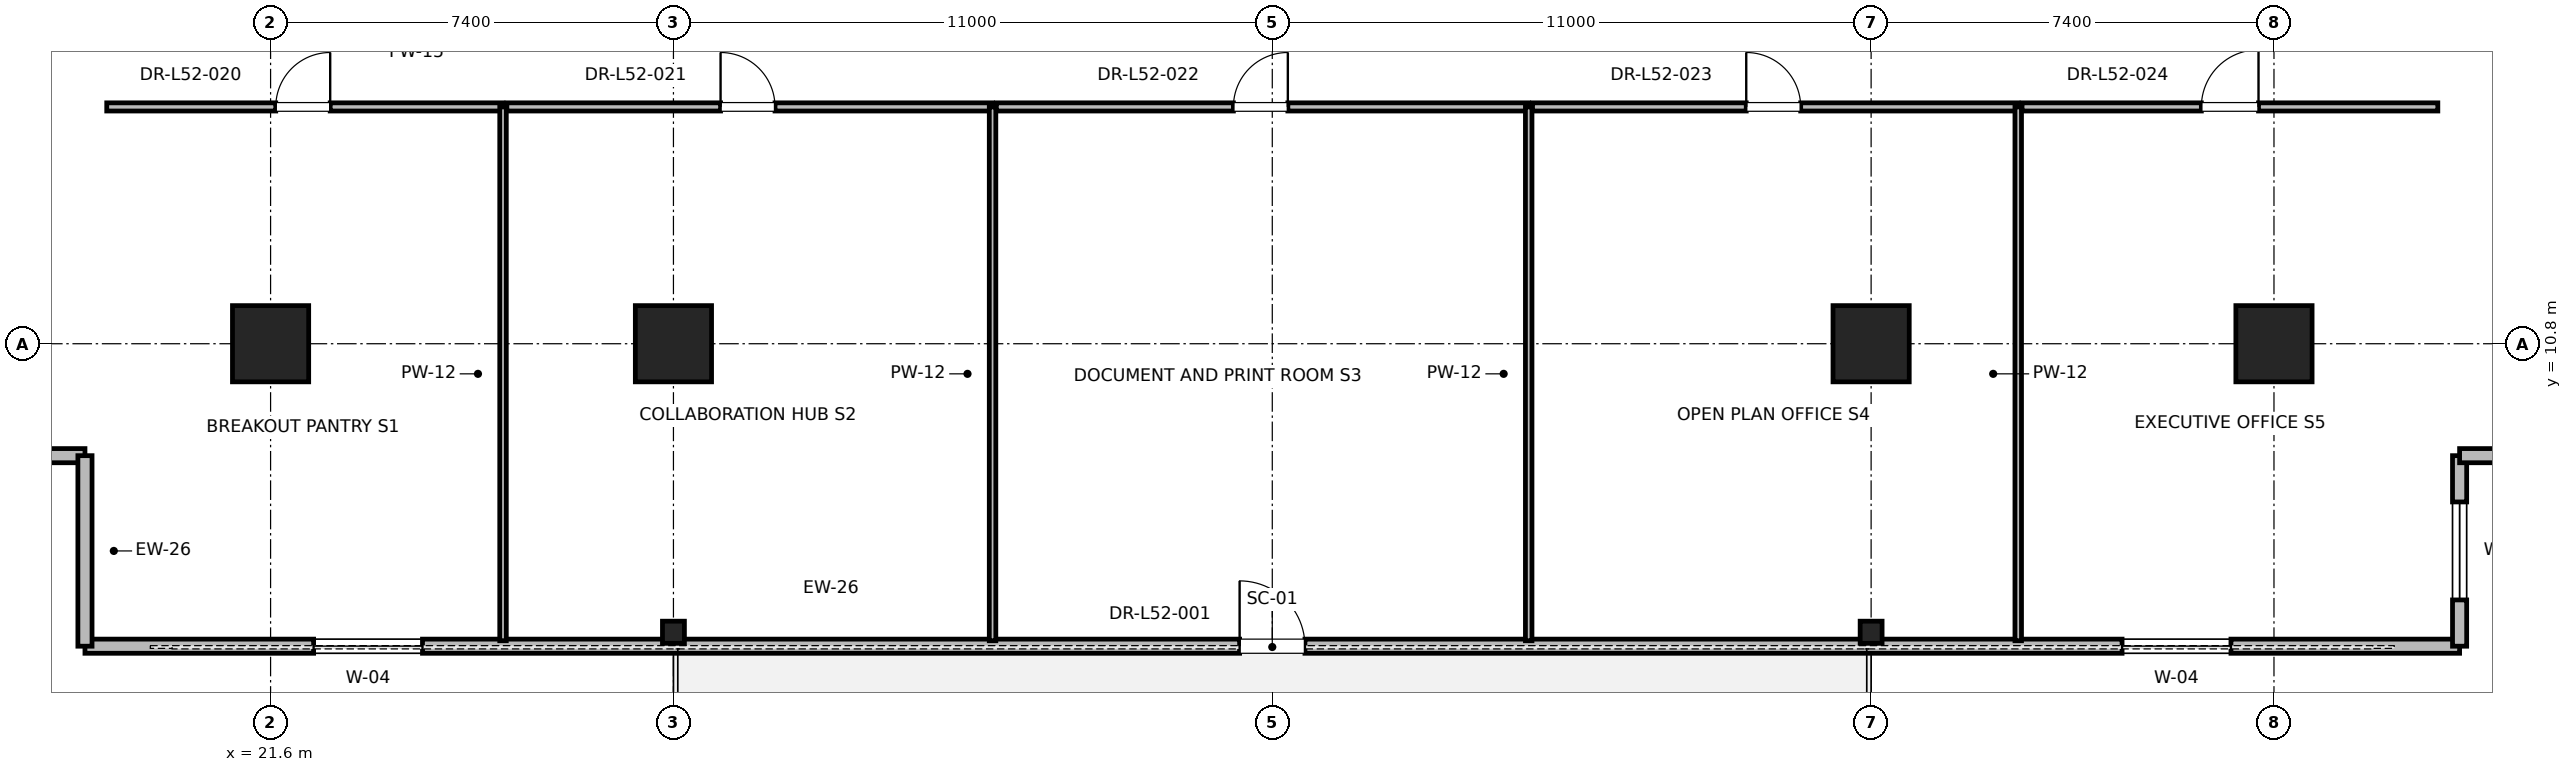
"""IFC4 building model, lengths in metres.
Left out: names, types, materials, properties, quantities, classifications, styles, units other than length and angle.
Written with IfcOpenShell. Run it as: python <this file> out.ifc"""

import sys

from ifc_helpers import new_model, si_unit, direction, frame, frame_2d, origin, origin_2d, place, context, subcontext, project, spatial, rectangle, i_section, extrude, element, fill, save


model = new_model("IFC4")
c1 = context("Model", 3, precision=1e-05, world=origin(), true_north=direction((0.0, 1.0)))
c2 = subcontext(c1, "Body", "Model", "MODEL_VIEW")
j1 = project(units=[si_unit("LENGTHUNIT", "METRE"), si_unit("PLANEANGLEUNIT", "RADIAN")], contexts=[c1])
p1 = place(None, origin())
s1 = spatial("IfcSite", under=j1, at=p1, CompositionType="ELEMENT")
p2 = place(p1, origin())
s2 = spatial("IfcBuilding", under=s1, at=p2, CompositionType="ELEMENT")
p3 = place(p2, frame((0.0, 0.0, 225.2)))
s3 = spatial("IfcBuildingStorey", under=s2, at=p3, CompositionType="ELEMENT", Elevation=225.2)
for number, where, z_axis, x_axis in (
    (1, (29.0, 10.8, 0.0), (0.0, 0.0, 1.0), (1.0, 0.0, 0.0)),
    (2, (51.0, 10.8, 0.0), (0.0, 0.0, 1.0), (1.0, 0.0, 0.0)),
    (3, (21.6, 10.8, 0.0), (0.0, 0.0, 1.0), (1.0, 0.0, 0.0)),
    (4, (58.4, 10.8, 0.0), (0.0, 0.0, 1.0), (1.0, 0.0, 0.0)),
):
    element("IfcColumn", number, at=place(p3, frame(where, z_axis=z_axis, x_axis=x_axis)), inside=s3, PredefinedType="COLUMN", context=c2, shape_type="SweptSolid", body=[
        extrude(rectangle(XDim=1.4, YDim=1.4, at=origin_2d()), origin(), (0.0, 0.0, 1.0), 4.0),
    ])
for number, where, z_axis, x_axis in (
    (5, (29.0, 5.5, 0.0), (0.0, 0.0, 1.0), (1.0, 0.0, 0.0)),
    (6, (51.0, 5.5, 0.0), (0.0, 0.0, 1.0), (1.0, 0.0, 0.0)),
):
    element("IfcColumn", number, at=place(p3, frame(where, z_axis=z_axis, x_axis=x_axis)), inside=s3, PredefinedType="COLUMN", context=c2, shape_type="SweptSolid", body=[
        extrude(i_section(OverallWidth=0.403, OverallDepth=0.406, WebThickness=0.027, FlangeThickness=0.043, FilletRadius=0.015, at=origin_2d()), origin(), (0.0, 0.0, 1.0), 4.0),
    ])
p4 = place(p3, frame((18.19, 5.244, 0.0), z_axis=(0.0, 0.0, 1.0), x_axis=(1.0, 0.0, 0.0)))
e7 = element("IfcWall", 7, at=p4, inside=s3, PredefinedType="PARAPET", context=c2, shape_type="SweptSolid", body=[
    extrude(rectangle(XDim=43.62, YDim=0.26, at=frame_2d((21.81, 0.0))), origin(), (0.0, 0.0, 1.0), 3.047),
])
p5 = place(p4, frame((4.2, 0.0, 0.85)))
e8 = element("IfcOpeningElement", 8, at=p5, cuts=e7, PredefinedType="OPENING", context=c2, shape_type="SweptSolid", body=[
    extrude(rectangle(XDim=2.0, YDim=2.3, at=frame_2d((1.0, 1.15))), frame((0.0, 0.13, 0.0), z_axis=(0.0, -1.0, 0.0), x_axis=(1.0, 0.0, 0.0)), (0.0, 0.0, 1.0), 0.26),
])
p6 = place(p4, frame((21.21, 0.0, 0.0)))
e9 = element("IfcOpeningElement", 9, at=p6, cuts=e7, PredefinedType="OPENING", context=c2, shape_type="SweptSolid", body=[
    extrude(rectangle(XDim=1.2, YDim=2.2, at=frame_2d((0.6, 1.1))), frame((0.0, 0.13, 0.0), z_axis=(0.0, -1.0, 0.0), x_axis=(1.0, 0.0, 0.0)), (0.0, 0.0, 1.0), 0.26),
])
p7 = place(p4, frame((37.419, 0.0, 0.85)))
e10 = element("IfcOpeningElement", 10, at=p7, cuts=e7, PredefinedType="OPENING", context=c2, shape_type="SweptSolid", body=[
    extrude(rectangle(XDim=2.0, YDim=2.3, at=frame_2d((1.0, 1.15))), frame((0.0, 0.13, 0.0), z_axis=(0.0, -1.0, 0.0), x_axis=(1.0, 0.0, 0.0)), (0.0, 0.0, 1.0), 0.26),
])
p8 = place(p3, frame((14.19, 8.744, 0.0), z_axis=(0.0, 0.0, 1.0), x_axis=(1.0, 0.0, 0.0)))
e11 = element("IfcWall", 11, at=p8, inside=s3, PredefinedType="PARAPET", context=c2, shape_type="SweptSolid", body=[
    extrude(rectangle(XDim=4.0, YDim=0.26, at=frame_2d((2.0, 0.0))), origin(), (0.0, 0.0, 1.0), 3.775),
])
p9 = place(p8, frame((1.1, 0.0, 0.85)))
e12 = element("IfcOpeningElement", 12, at=p9, cuts=e11, PredefinedType="OPENING", context=c2, shape_type="SweptSolid", body=[
    extrude(rectangle(XDim=1.8, YDim=2.2, at=frame_2d((0.9, 1.1))), frame((0.0, 0.13, 0.0), z_axis=(0.0, -1.0, 0.0), x_axis=(1.0, 0.0, 0.0)), (0.0, 0.0, 1.0), 0.26),
])
p10 = place(p3, frame((18.19, 8.744, 0.0), z_axis=(0.0, 0.0, 1.0), x_axis=(0.0, -1.0, 0.0)))
e13 = element("IfcWall", 13, at=p10, inside=s3, PredefinedType="PARAPET", context=c2, shape_type="SweptSolid", body=[
    extrude(rectangle(XDim=3.5, YDim=0.26, at=frame_2d((1.75, 0.0))), origin(), (0.0, 0.0, 1.0), 3.775),
])
p11 = place(p3, frame((61.81, 5.244, 0.0), z_axis=(0.0, 0.0, 1.0), x_axis=(0.0, 1.0, 0.0)))
e14 = element("IfcWall", 14, at=p11, inside=s3, PredefinedType="PARAPET", context=c2, shape_type="SweptSolid", body=[
    extrude(rectangle(XDim=3.5, YDim=0.26, at=frame_2d((1.75, 0.0))), origin(), (0.0, 0.0, 1.0), 3.775),
])
p12 = place(p11, frame((0.85, 0.0, 0.85)))
e15 = element("IfcOpeningElement", 15, at=p12, cuts=e14, PredefinedType="OPENING", context=c2, shape_type="SweptSolid", body=[
    extrude(rectangle(XDim=1.8, YDim=2.2, at=frame_2d((0.9, 1.1))), frame((0.0, 0.13, 0.0), z_axis=(0.0, -1.0, 0.0), x_axis=(1.0, 0.0, 0.0)), (0.0, 0.0, 1.0), 0.26),
])
p13 = place(p3, frame((61.81, 8.744, 0.0), z_axis=(0.0, 0.0, 1.0), x_axis=(1.0, 0.0, 0.0)))
e16 = element("IfcWall", 16, at=p13, inside=s3, PredefinedType="PARAPET", context=c2, shape_type="SweptSolid", body=[
    extrude(rectangle(XDim=4.0, YDim=0.26, at=frame_2d((2.0, 0.0))), origin(), (0.0, 0.0, 1.0), 3.775),
])
p14 = place(p3, frame((18.59, 15.15, 0.0), z_axis=(0.0, 0.0, 1.0), x_axis=(1.0, 0.0, 0.0)))
e17 = element("IfcWall", 17, at=p14, inside=s3, PredefinedType="PARTITIONING", context=c2, shape_type="SweptSolid", body=[
    extrude(rectangle(XDim=7.279, YDim=0.15, at=frame_2d((3.64, 0.0))), origin(), (0.0, 0.0, 1.0), 2.85),
])
p15 = place(p14, frame((3.104, 0.0, 0.0)))
e18 = element("IfcOpeningElement", 18, at=p15, cuts=e17, PredefinedType="OPENING", context=c2, shape_type="SweptSolid", body=[
    extrude(rectangle(XDim=1.0, YDim=2.15, at=frame_2d((0.5, 1.075))), frame((0.0, 0.075, 0.0), z_axis=(0.0, -1.0, 0.0), x_axis=(1.0, 0.0, 0.0)), (0.0, 0.0, 1.0), 0.15),
])
p16 = place(p3, frame((25.87, 5.344, 0.0), z_axis=(0.0, 0.0, 1.0), x_axis=(0.0, 1.0, 0.0)))
e19 = element("IfcWall", 19, at=p16, inside=s3, PredefinedType="PARTITIONING", context=c2, shape_type="SweptSolid", body=[
    extrude(rectangle(XDim=9.806, YDim=0.12, at=frame_2d((4.903, 0.0))), origin(), (0.0, 0.0, 1.0), 2.85),
])
p17 = place(p3, frame((25.94, 15.15, 0.0), z_axis=(0.0, 0.0, 1.0), x_axis=(1.0, 0.0, 0.0)))
e20 = element("IfcWall", 20, at=p17, inside=s3, PredefinedType="PARTITIONING", context=c2, shape_type="SweptSolid", body=[
    extrude(rectangle(XDim=8.922, YDim=0.15, at=frame_2d((4.461, 0.0))), origin(), (0.0, 0.0, 1.0), 2.85),
])
p18 = place(p17, frame((3.926, 0.0, 0.0)))
e21 = element("IfcOpeningElement", 21, at=p18, cuts=e20, PredefinedType="OPENING", context=c2, shape_type="SweptSolid", body=[
    extrude(rectangle(XDim=1.0, YDim=2.15, at=frame_2d((0.5, 1.075))), frame((0.0, 0.075, 0.0), z_axis=(0.0, -1.0, 0.0), x_axis=(1.0, 0.0, 0.0)), (0.0, 0.0, 1.0), 0.15),
])
p19 = place(p3, frame((34.862, 5.344, 0.0), z_axis=(0.0, 0.0, 1.0), x_axis=(0.0, 1.0, 0.0)))
e22 = element("IfcWall", 22, at=p19, inside=s3, PredefinedType="PARTITIONING", context=c2, shape_type="SweptSolid", body=[
    extrude(rectangle(XDim=9.806, YDim=0.12, at=frame_2d((4.903, 0.0))), origin(), (0.0, 0.0, 1.0), 2.405),
])
p20 = place(p3, frame((34.932, 15.15, 0.0), z_axis=(0.0, 0.0, 1.0), x_axis=(1.0, 0.0, 0.0)))
e23 = element("IfcWall", 23, at=p20, inside=s3, PredefinedType="PARTITIONING", context=c2, shape_type="SweptSolid", body=[
    extrude(rectangle(XDim=9.779, YDim=0.15, at=frame_2d((4.889, 0.0))), origin(), (0.0, 0.0, 1.0), 2.85),
])
p21 = place(p20, frame((4.354, 0.0, 0.0)))
e24 = element("IfcOpeningElement", 24, at=p21, cuts=e23, PredefinedType="OPENING", context=c2, shape_type="SweptSolid", body=[
    extrude(rectangle(XDim=1.0, YDim=2.15, at=frame_2d((0.5, 1.075))), frame((0.0, 0.075, 0.0), z_axis=(0.0, -1.0, 0.0), x_axis=(1.0, 0.0, 0.0)), (0.0, 0.0, 1.0), 0.15),
])
p22 = place(p3, frame((44.71, 5.344, 0.0), z_axis=(0.0, 0.0, 1.0), x_axis=(0.0, 1.0, 0.0)))
e25 = element("IfcWall", 25, at=p22, inside=s3, PredefinedType="PARTITIONING", context=c2, shape_type="SweptSolid", body=[
    extrude(rectangle(XDim=9.806, YDim=0.12, at=frame_2d((4.903, 0.0))), origin(), (0.0, 0.0, 1.0), 2.405),
])
p23 = place(p3, frame((44.78, 15.15, 0.0), z_axis=(0.0, 0.0, 1.0), x_axis=(1.0, 0.0, 0.0)))
e26 = element("IfcWall", 26, at=p23, inside=s3, PredefinedType="PARTITIONING", context=c2, shape_type="SweptSolid", body=[
    extrude(rectangle(XDim=8.922, YDim=0.15, at=frame_2d((4.461, 0.0))), origin(), (0.0, 0.0, 1.0), 2.85),
])
p24 = place(p23, frame((3.926, 0.0, 0.0)))
e27 = element("IfcOpeningElement", 27, at=p24, cuts=e26, PredefinedType="OPENING", context=c2, shape_type="SweptSolid", body=[
    extrude(rectangle(XDim=1.0, YDim=2.15, at=frame_2d((0.5, 1.075))), frame((0.0, 0.075, 0.0), z_axis=(0.0, -1.0, 0.0), x_axis=(1.0, 0.0, 0.0)), (0.0, 0.0, 1.0), 0.15),
])
p25 = place(p3, frame((53.702, 5.344, 0.0), z_axis=(0.0, 0.0, 1.0), x_axis=(0.0, 1.0, 0.0)))
e28 = element("IfcWall", 28, at=p25, inside=s3, PredefinedType="PARTITIONING", context=c2, shape_type="SweptSolid", body=[
    extrude(rectangle(XDim=9.806, YDim=0.12, at=frame_2d((4.903, 0.0))), origin(), (0.0, 0.0, 1.0), 2.85),
])
p26 = place(p3, frame((53.772, 15.15, 0.0), z_axis=(0.0, 0.0, 1.0), x_axis=(1.0, 0.0, 0.0)))
e29 = element("IfcWall", 29, at=p26, inside=s3, PredefinedType="PARTITIONING", context=c2, shape_type="SweptSolid", body=[
    extrude(rectangle(XDim=7.637, YDim=0.15, at=frame_2d((3.819, 0.0))), origin(), (0.0, 0.0, 1.0), 2.85),
])
p27 = place(p26, frame((3.294, 0.0, 0.0)))
e30 = element("IfcOpeningElement", 30, at=p27, cuts=e29, PredefinedType="OPENING", context=c2, shape_type="SweptSolid", body=[
    extrude(rectangle(XDim=1.05, YDim=2.2, at=frame_2d((0.525, 1.1))), frame((0.0, 0.075, 0.0), z_axis=(0.0, -1.0, 0.0), x_axis=(1.0, 0.0, 0.0)), (0.0, 0.0, 1.0), 0.15),
])
p28 = place(p5, origin())
e31 = element("IfcWindow", 31, at=p28, inside=s3, PartitioningType="SINGLE_PANEL", PredefinedType="WINDOW", context=c2, shape_type="SweptSolid", body=[
    extrude(rectangle(XDim=2.0, YDim=2.3, at=frame_2d((1.0, 1.15))), frame((0.0, 0.03, 0.0), z_axis=(0.0, -1.0, 0.0), x_axis=(1.0, 0.0, 0.0)), (0.0, 0.0, 1.0), 0.06),
])
fill(e8, e31)
p29 = place(p6, origin())
e32 = element("IfcDoor", 32, at=p29, inside=s3, OperationType="SINGLE_SWING_LEFT", PredefinedType="DOOR", context=c2, shape_type="SweptSolid", body=[
    extrude(rectangle(XDim=1.2, YDim=2.2, at=frame_2d((0.6, 1.1))), frame((0.0, 0.025, 0.0), z_axis=(0.0, -1.0, 0.0), x_axis=(1.0, 0.0, 0.0)), (0.0, 0.0, 1.0), 0.05),
])
fill(e9, e32)
p30 = place(p7, origin())
e33 = element("IfcWindow", 33, at=p30, inside=s3, PartitioningType="SINGLE_PANEL", PredefinedType="WINDOW", context=c2, shape_type="SweptSolid", body=[
    extrude(rectangle(XDim=2.0, YDim=2.3, at=frame_2d((1.0, 1.15))), frame((0.0, 0.03, 0.0), z_axis=(0.0, -1.0, 0.0), x_axis=(1.0, 0.0, 0.0)), (0.0, 0.0, 1.0), 0.06),
])
fill(e10, e33)
p31 = place(p12, origin())
e34 = element("IfcWindow", 34, at=p31, inside=s3, PartitioningType="SINGLE_PANEL", PredefinedType="WINDOW", context=c2, shape_type="SweptSolid", body=[
    extrude(rectangle(XDim=1.8, YDim=2.2, at=frame_2d((0.9, 1.1))), frame((0.0, 0.03, 0.0), z_axis=(0.0, -1.0, 0.0), x_axis=(1.0, 0.0, 0.0)), (0.0, 0.0, 1.0), 0.06),
])
fill(e15, e34)
p32 = place(p15, origin())
e35 = element("IfcDoor", 35, at=p32, inside=s3, OperationType="SINGLE_SWING_RIGHT", PredefinedType="DOOR", context=c2, shape_type="SweptSolid", body=[
    extrude(rectangle(XDim=1.0, YDim=2.15, at=frame_2d((0.5, 1.075))), frame((0.0, 0.025, 0.0), z_axis=(0.0, -1.0, 0.0), x_axis=(1.0, 0.0, 0.0)), (0.0, 0.0, 1.0), 0.05),
])
fill(e18, e35)
p33 = place(p18, origin())
e36 = element("IfcDoor", 36, at=p33, inside=s3, OperationType="SINGLE_SWING_LEFT", PredefinedType="DOOR", context=c2, shape_type="SweptSolid", body=[
    extrude(rectangle(XDim=1.0, YDim=2.15, at=frame_2d((0.5, 1.075))), frame((0.0, 0.025, 0.0), z_axis=(0.0, -1.0, 0.0), x_axis=(1.0, 0.0, 0.0)), (0.0, 0.0, 1.0), 0.05),
])
fill(e21, e36)
p34 = place(p21, origin())
e37 = element("IfcDoor", 37, at=p34, inside=s3, OperationType="SINGLE_SWING_RIGHT", PredefinedType="DOOR", context=c2, shape_type="SweptSolid", body=[
    extrude(rectangle(XDim=1.0, YDim=2.15, at=frame_2d((0.5, 1.075))), frame((0.0, 0.025, 0.0), z_axis=(0.0, -1.0, 0.0), x_axis=(1.0, 0.0, 0.0)), (0.0, 0.0, 1.0), 0.05),
])
fill(e24, e37)
p35 = place(p24, origin())
e38 = element("IfcDoor", 38, at=p35, inside=s3, OperationType="SINGLE_SWING_LEFT", PredefinedType="DOOR", context=c2, shape_type="SweptSolid", body=[
    extrude(rectangle(XDim=1.0, YDim=2.15, at=frame_2d((0.5, 1.075))), frame((0.0, 0.025, 0.0), z_axis=(0.0, -1.0, 0.0), x_axis=(1.0, 0.0, 0.0)), (0.0, 0.0, 1.0), 0.05),
])
fill(e27, e38)
p36 = place(p27, origin())
e39 = element("IfcDoor", 39, at=p36, inside=s3, OperationType="SINGLE_SWING_RIGHT", PredefinedType="DOOR", context=c2, shape_type="SweptSolid", body=[
    extrude(rectangle(XDim=1.05, YDim=2.2, at=frame_2d((0.525, 1.1))), frame((0.0, 0.025, 0.0), z_axis=(0.0, -1.0, 0.0), x_axis=(1.0, 0.0, 0.0)), (0.0, 0.0, 1.0), 0.05),
])
fill(e30, e39)
save(model, sys.argv[1])
